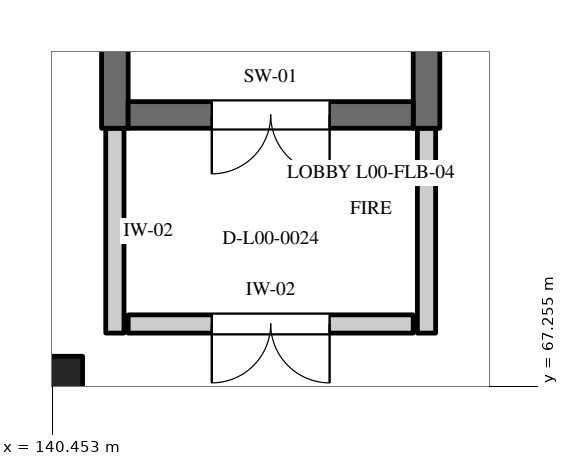
"""IFC4 building model, lengths in metres.
Left out: names, types, materials, properties, quantities, classifications, styles, units other than length and angle.
Written with IfcOpenShell. Run it as: python <this file> out.ifc"""

import sys

from ifc_helpers import new_model, si_unit, direction, frame, frame_2d, origin, origin_2d, place, context, subcontext, project, spatial, rectangle, extrude, element, fill, save


model = new_model("IFC4")
c1 = context("Model", 3, precision=1e-05, world=origin(), true_north=direction((0.0, 1.0)))
c2 = subcontext(c1, "Body", "Model", "MODEL_VIEW")
j1 = project(units=[si_unit("LENGTHUNIT", "METRE"), si_unit("PLANEANGLEUNIT", "RADIAN")], contexts=[c1])
p1 = place(None, origin())
s1 = spatial("IfcSite", under=j1, at=p1, CompositionType="ELEMENT")
p2 = place(p1, origin())
s2 = spatial("IfcBuilding", under=s1, at=p2, CompositionType="ELEMENT")
p3 = place(p2, origin())
s3 = spatial("IfcBuildingStorey", under=s2, at=p3, CompositionType="ELEMENT", Elevation=0.0)
p4 = place(p3, frame((140.4, 67.2, 0.0), z_axis=(0.0, 0.0, 1.0), x_axis=(1.0, 0.0, 0.0)))
e1 = element("IfcColumn", 1, at=p4, inside=s3, PredefinedType="COLUMN", context=c2, shape_type="SweptSolid", body=[
    extrude(rectangle(XDim=0.9, YDim=0.9, at=origin_2d()), origin(), (0.0, 0.0, 1.0), 4.8),
])
for number, where, z_axis, x_axis in (
    (2, (141.275, 70.65, 0.0), (0.0, 0.0, 1.0), (0.0, 1.0, 0.0)),
    (3, (145.375, 70.65, 0.0), (0.0, 0.0, 1.0), (0.0, 1.0, 0.0)),
):
    element("IfcWall", number, at=place(p3, frame(where, z_axis=z_axis, x_axis=x_axis)), inside=s3, PredefinedType="SHEAR", context=c2, shape_type="SweptSolid", body=[
        extrude(rectangle(XDim=10.5, YDim=0.35, at=frame_2d((5.25, 0.0))), origin(), (0.0, 0.0, 1.0), 4.8),
    ])
p5 = place(p3, frame((141.45, 70.825, 0.0), z_axis=(0.0, 0.0, 1.0), x_axis=(1.0, 0.0, 0.0)))
e4 = element("IfcWall", 4, at=p5, inside=s3, PredefinedType="SHEAR", context=c2, shape_type="SweptSolid", body=[
    extrude(rectangle(XDim=3.75, YDim=0.35, at=frame_2d((1.875, 0.0))), origin(), (0.0, 0.0, 1.0), 4.45),
])
p6 = place(p5, frame((1.1, 0.0, 0.0)))
e5 = element("IfcOpeningElement", 5, at=p6, cuts=e4, PredefinedType="OPENING", context=c2, shape_type="SweptSolid", body=[
    extrude(rectangle(XDim=1.55, YDim=2.25, at=frame_2d((0.775, 1.125))), frame((0.0, 0.187, 0.0), z_axis=(0.0, -1.0, 0.0), x_axis=(1.0, 0.0, 0.0)), (0.0, 0.0, 1.0), 0.374),
])
for number, where, z_axis, x_axis in (
    (6, (141.275, 67.955, 0.0), (0.0, 0.0, 1.0), (0.0, 1.0, 0.0)),
    (7, (145.375, 67.955, 0.0), (0.0, 0.0, 1.0), (0.0, 1.0, 0.0)),
):
    element("IfcWall", number, at=place(p3, frame(where, z_axis=z_axis, x_axis=x_axis)), inside=s3, PredefinedType="STANDARD", context=c2, shape_type="SweptSolid", body=[
        extrude(rectangle(XDim=2.695, YDim=0.24, at=frame_2d((1.347, 0.0))), origin(), (0.0, 0.0, 1.0), 4.45),
    ])
p7 = place(p3, frame((141.45, 68.075, 0.0), z_axis=(0.0, 0.0, 1.0), x_axis=(1.0, 0.0, 0.0)))
e8 = element("IfcWall", 8, at=p7, inside=s3, PredefinedType="STANDARD", context=c2, shape_type="SweptSolid", body=[
    extrude(rectangle(XDim=3.75, YDim=0.24, at=frame_2d((1.875, 0.0))), origin(), (0.0, 0.0, 1.0), 4.45),
])
p8 = place(p7, frame((1.1, 0.0, 0.0)))
e9 = element("IfcOpeningElement", 9, at=p8, cuts=e8, PredefinedType="OPENING", context=c2, shape_type="SweptSolid", body=[
    extrude(rectangle(XDim=1.55, YDim=2.25, at=frame_2d((0.775, 1.125))), frame((0.0, 0.132, 0.0), z_axis=(0.0, -1.0, 0.0), x_axis=(1.0, 0.0, 0.0)), (0.0, 0.0, 1.0), 0.264),
])
p9 = place(p6, frame((1.55, 0.0, 0.0), z_axis=(0.0, 0.0, 1.0), x_axis=(-1.0, 0.0, 0.0)))
e10 = element("IfcDoor", 10, at=p9, inside=s3, OperationType="DOUBLE_DOOR_SINGLE_SWING", PredefinedType="DOOR", context=c2, shape_type="SweptSolid", body=[
    extrude(rectangle(XDim=1.55, YDim=2.25, at=frame_2d((0.775, 1.125))), frame((0.0, 0.025, 0.0), z_axis=(0.0, -1.0, 0.0), x_axis=(1.0, 0.0, 0.0)), (0.0, 0.0, 1.0), 0.05),
])
fill(e5, e10)
p10 = place(p8, frame((1.55, 0.0, 0.0), z_axis=(0.0, 0.0, 1.0), x_axis=(-1.0, 0.0, 0.0)))
e11 = element("IfcDoor", 11, at=p10, inside=s3, OperationType="DOUBLE_DOOR_SINGLE_SWING", PredefinedType="DOOR", context=c2, shape_type="SweptSolid", body=[
    extrude(rectangle(XDim=1.55, YDim=2.25, at=frame_2d((0.775, 1.125))), frame((0.0, 0.025, 0.0), z_axis=(0.0, -1.0, 0.0), x_axis=(1.0, 0.0, 0.0)), (0.0, 0.0, 1.0), 0.05),
])
fill(e9, e11)
save(model, sys.argv[1])
